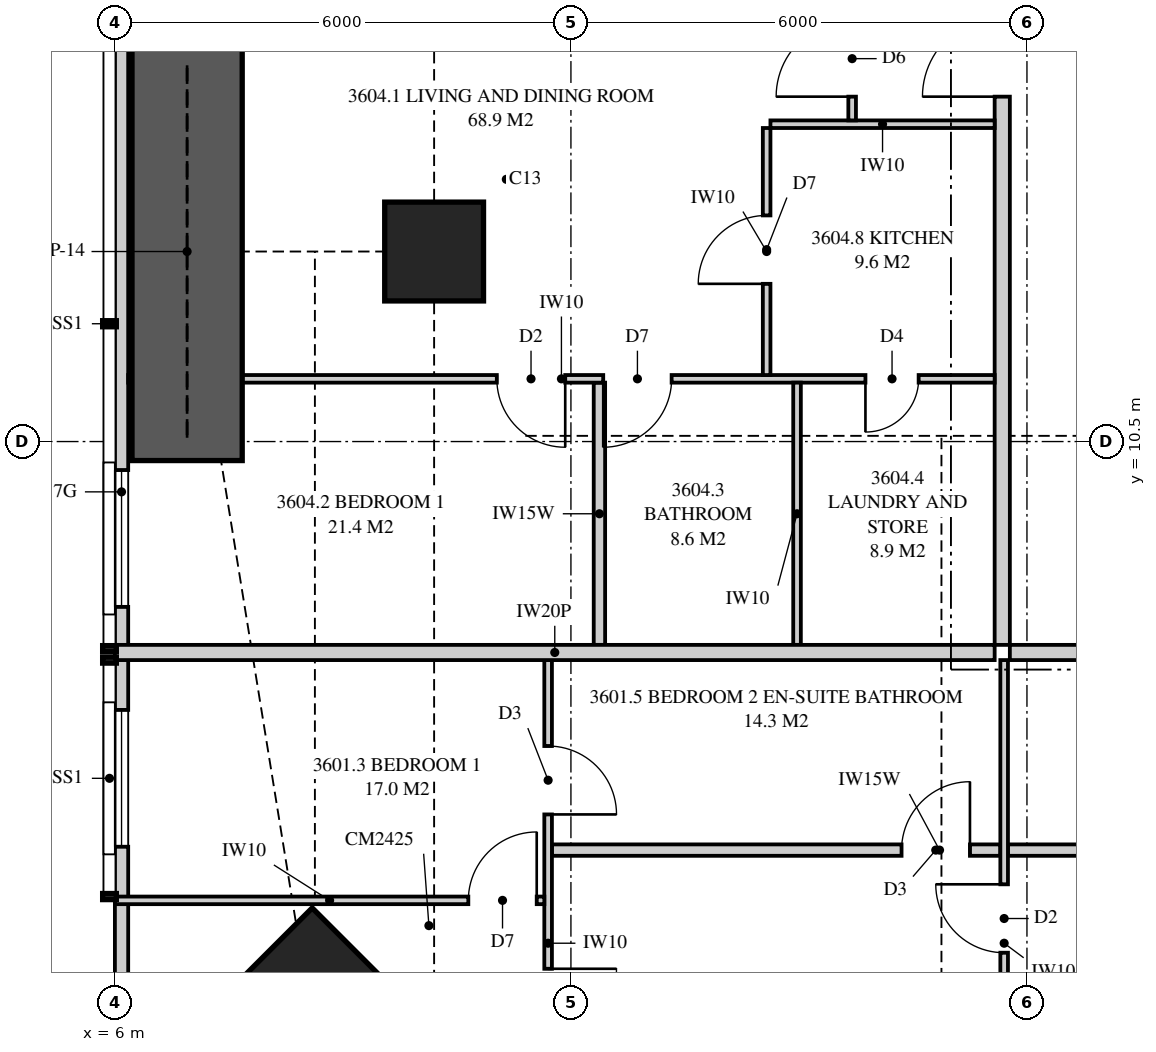
"""IFC4 building model, lengths in metres.
Left out: names, types, materials, properties, quantities, classifications, styles, units other than length and angle.
Written with IfcOpenShell. Run it as: python <this file> out.ifc"""

import sys

from ifc_helpers import new_model, si_unit, direction, frame, frame_2d, origin, origin_2d, place, context, subcontext, project, spatial, polyline, rectangle, outline, extrude, element, fill, save


model = new_model("IFC4")
c1 = context("Model", 3, precision=1e-05, world=origin(), true_north=direction((0.0, 1.0)))
c2 = subcontext(c1, "Body", "Model", "MODEL_VIEW")
j1 = project(units=[si_unit("LENGTHUNIT", "METRE"), si_unit("PLANEANGLEUNIT", "RADIAN")], contexts=[c1])
p1 = place(None, origin())
s1 = spatial("IfcSite", under=j1, at=p1, CompositionType="ELEMENT")
p2 = place(p1, origin())
s2 = spatial("IfcBuilding", under=s1, at=p2, CompositionType="ELEMENT")
p3 = place(p2, frame((0.0, 0.0, 131.65)))
s3 = spatial("IfcBuildingStorey", under=s2, at=p3, CompositionType="ELEMENT", Elevation=131.65)
p4 = place(p3, frame((8.631, 2.631, 0.0), z_axis=(0.0, 0.0, 1.0), x_axis=(0.707106781187, 0.707106781187, 0.0)))
e1 = element("IfcColumn", 1, at=p4, inside=s3, PredefinedType="COLUMN", context=c2, shape_type="SweptSolid", body=[
    extrude(rectangle(XDim=2.4, YDim=2.5, at=origin_2d()), origin(), (0.0, 0.0, 1.0), 3.35),
])
p5 = place(p3, frame((10.2, 13.0, 0.0), z_axis=(0.0, 0.0, 1.0), x_axis=(1.0, 0.0, 0.0)))
e2 = element("IfcColumn", 2, at=p5, inside=s3, PredefinedType="COLUMN", context=c2, shape_type="SweptSolid", body=[
    extrude(rectangle(XDim=1.3, YDim=1.3, at=origin_2d()), origin(), (0.0, 0.0, 1.0), 3.35),
])
p6 = place(p3, frame((6.087, 16.625, 0.0), z_axis=(0.0, 0.0, 1.0), x_axis=(0.0, -1.0, 0.0)))
e3 = element("IfcWall", 3, at=p6, inside=s3, PredefinedType="SOLIDWALL", context=c2, shape_type="SweptSolid", body=[
    extrude(outline(polyline([(0.0, 0.0), (13.574, 0.0), (13.574, 3.11), (3.844, 3.11), (3.844, 2.15), (3.751, 2.15), (3.751, 3.11), (3.625, 3.11), (3.625, 2.15), (0.0, 2.15), (0.0, 0.0)])), frame((0.0, 0.087, 0.0), z_axis=(0.0, -1.0, 0.0), x_axis=(1.0, 0.0, 0.0)), (0.0, 0.0, 1.0), 0.175),
])
p7 = place(p6, frame((6.5, 0.0, 0.4)))
e4 = element("IfcOpeningElement", 4, at=p7, cuts=e3, PredefinedType="OPENING", context=c2, shape_type="SweptSolid", body=[
    extrude(rectangle(XDim=1.8, YDim=1.7, at=frame_2d((0.9, 0.85))), frame((0.0, 0.097, 0.0), z_axis=(0.0, -1.0, 0.0), x_axis=(1.0, 0.0, 0.0)), (0.0, 0.0, 1.0), 0.195),
])
p8 = place(p6, frame((9.656, 0.0, 0.4)))
e5 = element("IfcOpeningElement", 5, at=p8, cuts=e3, PredefinedType="OPENING", context=c2, shape_type="SweptSolid", body=[
    extrude(rectangle(XDim=1.8, YDim=1.7, at=frame_2d((0.9, 0.85))), frame((0.0, 0.097, 0.0), z_axis=(0.0, -1.0, 0.0), x_axis=(1.0, 0.0, 0.0)), (0.0, 0.0, 1.0), 0.195),
])
p9 = place(p3, frame((17.775, 7.725, 0.0), z_axis=(0.0, 0.0, 1.0), x_axis=(1.0, 0.0, 0.0)))
e6 = element("IfcWall", 6, at=p9, inside=s3, PredefinedType="PARTITIONING", context=c2, shape_type="SweptSolid", body=[
    extrude(outline(polyline([(0.0, 0.0), (22.325, 0.0), (22.325, 3.11), (21.187, 3.11), (21.187, 2.541), (20.513, 2.541), (20.513, 3.11), (10.312, 3.11), (10.312, 2.541), (9.638, 2.541), (9.638, 3.11), (0.0, 3.11), (0.0, 0.0)])), frame((0.0, 0.1, 0.0), z_axis=(0.0, -1.0, 0.0), x_axis=(1.0, 0.0, 0.0)), (0.0, 0.0, 1.0), 0.2),
])
p10 = place(p9, frame((4.825, 0.0, 0.0)))
e7 = element("IfcOpeningElement", 7, at=p10, cuts=e6, PredefinedType="OPENING", context=c2, shape_type="SweptSolid", body=[
    extrude(rectangle(XDim=1.05, YDim=2.2, at=frame_2d((0.525, 1.1))), frame((0.0, 0.11, 0.0), z_axis=(0.0, -1.0, 0.0), x_axis=(1.0, 0.0, 0.0)), (0.0, 0.0, 1.0), 0.22),
])
p11 = place(p3, frame((11.7, 0.175, 0.0), z_axis=(0.0, 0.0, 1.0), x_axis=(0.0, 1.0, 0.0)))
e8 = element("IfcWall", 8, at=p11, inside=s3, PredefinedType="PARTITIONING", context=c2, shape_type="SweptSolid", body=[
    extrude(outline(polyline([(0.0, 0.0), (7.45, 0.0), (7.45, 3.11), (2.708, 3.11), (2.708, 2.15), (0.953, 2.15), (0.953, 3.11), (0.0, 3.11), (0.0, 0.0)])), frame((0.0, 0.05, 0.0), z_axis=(0.0, -1.0, 0.0), x_axis=(1.0, 0.0, 0.0)), (0.0, 0.0, 1.0), 0.1),
])
p12 = place(p11, frame((2.489, 0.0, 0.0)))
e9 = element("IfcOpeningElement", 9, at=p12, cuts=e8, PredefinedType="OPENING", context=c2, shape_type="SweptSolid", body=[
    extrude(rectangle(XDim=0.9, YDim=2.1, at=frame_2d((0.45, 1.05))), frame((0.0, 0.06, 0.0), z_axis=(0.0, -1.0, 0.0), x_axis=(1.0, 0.0, 0.0)), (0.0, 0.0, 1.0), 0.12),
])
p13 = place(p11, frame((5.419, 0.0, 0.0)))
e10 = element("IfcOpeningElement", 10, at=p13, cuts=e8, PredefinedType="OPENING", context=c2, shape_type="SweptSolid", body=[
    extrude(rectangle(XDim=0.9, YDim=2.1, at=frame_2d((0.45, 1.05))), frame((0.0, 0.06, 0.0), z_axis=(0.0, -1.0, 0.0), x_axis=(1.0, 0.0, 0.0)), (0.0, 0.0, 1.0), 0.12),
])
p14 = place(p3, frame((17.7, 0.175, 0.0), z_axis=(0.0, 0.0, 1.0), x_axis=(0.0, 1.0, 0.0)))
e11 = element("IfcWall", 11, at=p14, inside=s3, PredefinedType="PARTITIONING", context=c2, shape_type="SweptSolid", body=[
    extrude(outline(polyline([(1.635, 2.15), (0.0, 2.15), (0.0, 0.0), (7.45, 0.0), (7.45, 3.11), (1.635, 3.11), (1.635, 2.15)]), holes=[polyline([(1.021, 0.116), (0.529, 0.116), (0.529, 0.906), (1.021, 0.906), (1.021, 0.116)]), polyline([(1.021, 1.244), (0.529, 1.244), (0.529, 2.034), (1.021, 2.034), (1.021, 1.244)])]), frame((0.0, 0.05, 0.0), z_axis=(0.0, -1.0, 0.0), x_axis=(1.0, 0.0, 0.0)), (0.0, 0.0, 1.0), 0.1),
])
p15 = place(p14, frame((3.6, 0.0, 0.0)))
e12 = element("IfcOpeningElement", 12, at=p15, cuts=e11, PredefinedType="OPENING", context=c2, shape_type="SweptSolid", body=[
    extrude(rectangle(XDim=0.9, YDim=2.1, at=frame_2d((0.45, 1.05))), frame((0.0, 0.06, 0.0), z_axis=(0.0, -1.0, 0.0), x_axis=(1.0, 0.0, 0.0)), (0.0, 0.0, 1.0), 0.12),
])
p16 = place(p3, frame((6.0, 4.464, 0.0), z_axis=(0.0, 0.0, 1.0), x_axis=(1.0, 0.0, 0.0)))
e13 = element("IfcWall", 13, at=p16, inside=s3, PredefinedType="PARTITIONING", context=c2, shape_type="SweptSolid", body=[
    extrude(outline(polyline([(0.0, 0.0), (5.65, 0.0), (5.65, 3.11), (5.46, 3.11), (5.46, 2.51), (3.206, 2.51), (3.206, 2.15), (1.463, 2.15), (1.463, 3.11), (0.0, 3.11), (0.0, 0.0)])), frame((0.0, 0.05, 0.0), z_axis=(0.0, -1.0, 0.0), x_axis=(1.0, 0.0, 0.0)), (0.0, 0.0, 1.0), 0.1),
])
p17 = place(p16, frame((4.65, 0.0, 0.0)))
e14 = element("IfcOpeningElement", 14, at=p17, cuts=e13, PredefinedType="OPENING", context=c2, shape_type="SweptSolid", body=[
    extrude(rectangle(XDim=0.9, YDim=2.1, at=frame_2d((0.45, 1.05))), frame((0.0, 0.06, 0.0), z_axis=(0.0, -1.0, 0.0), x_axis=(1.0, 0.0, 0.0)), (0.0, 0.0, 1.0), 0.12),
])
p18 = place(p3, frame((11.75, 5.125, 0.0), z_axis=(0.0, 0.0, 1.0), x_axis=(1.0, 0.0, 0.0)))
e15 = element("IfcWall", 15, at=p18, inside=s3, PredefinedType="PLUMBINGWALL", context=c2, shape_type="SweptSolid", body=[
    extrude(outline(polyline([(0.0, 0.0), (5.9, 0.0), (5.9, 3.11), (5.438, 3.11), (5.438, 2.541), (4.812, 2.541), (4.812, 3.11), (0.0, 3.11), (0.0, 0.0)])), frame((0.0, 0.075, 0.0), z_axis=(0.0, -1.0, 0.0), x_axis=(1.0, 0.0, 0.0)), (0.0, 0.0, 1.0), 0.15),
])
p19 = place(p18, frame((4.6, 0.0, 0.0)))
e16 = element("IfcOpeningElement", 16, at=p19, cuts=e15, PredefinedType="OPENING", context=c2, shape_type="SweptSolid", body=[
    extrude(rectangle(XDim=0.9, YDim=2.1, at=frame_2d((0.45, 1.05))), frame((0.0, 0.085, 0.0), z_axis=(0.0, -1.0, 0.0), x_axis=(1.0, 0.0, 0.0)), (0.0, 0.0, 1.0), 0.17),
])
p20 = place(p3, frame((17.75, 5.125, 0.0), z_axis=(0.0, 0.0, 1.0), x_axis=(1.0, 0.0, 0.0)))
e17 = element("IfcWall", 17, at=p20, inside=s3, PredefinedType="PLUMBINGWALL", context=c2, shape_type="SweptSolid", body=[
    extrude(rectangle(XDim=4.2, YDim=0.15, at=frame_2d((2.1, 0.0))), origin(), (0.0, 0.0, 1.0), 3.11),
])
p21 = place(p3, frame((6.0, 7.725, 0.0), z_axis=(0.0, 0.0, 1.0), x_axis=(1.0, 0.0, 0.0)))
e18 = element("IfcWall", 18, at=p21, inside=s3, PredefinedType="PARTITIONING", context=c2, shape_type="SweptSolid", body=[
    extrude(outline(polyline([(0.0, 0.0), (11.575, 0.0), (11.575, 3.11), (11.212, 3.11), (11.212, 2.541), (10.538, 2.541), (10.538, 3.11), (5.51, 3.11), (5.51, 2.51), (2.969, 2.51), (2.969, 2.541), (2.727, 2.541), (2.727, 2.15), (0.884, 2.15), (0.884, 3.11), (0.0, 3.11), (0.0, 0.0)])), frame((0.0, 0.1, 0.0), z_axis=(0.0, -1.0, 0.0), x_axis=(1.0, 0.0, 0.0)), (0.0, 0.0, 1.0), 0.2),
])
p22 = place(p3, frame((17.675, 7.825, 0.0), z_axis=(0.0, 0.0, 1.0), x_axis=(0.0, 1.0, 0.0)))
e19 = element("IfcWall", 19, at=p22, inside=s3, PredefinedType="PARTITIONING", context=c2, shape_type="SweptSolid", body=[
    extrude(outline(polyline([(0.0, 0.0), (15.425, 0.0), (15.425, 3.11), (3.087, 3.11), (3.087, 2.541), (2.413, 2.541), (2.413, 3.11), (0.0, 3.11), (0.0, 0.0)])), frame((0.0, 0.1, 0.0), z_axis=(0.0, -1.0, 0.0), x_axis=(1.0, 0.0, 0.0)), (0.0, 0.0, 1.0), 0.2),
])
p23 = place(p22, frame((7.212, 0.0, 0.0)))
e20 = element("IfcOpeningElement", 20, at=p23, cuts=e19, PredefinedType="OPENING", context=c2, shape_type="SweptSolid", body=[
    extrude(rectangle(XDim=1.05, YDim=2.2, at=frame_2d((0.525, 1.1))), frame((0.0, 0.11, 0.0), z_axis=(0.0, -1.0, 0.0), x_axis=(1.0, 0.0, 0.0)), (0.0, 0.0, 1.0), 0.22),
])
p24 = place(p3, frame((6.175, 11.325, 0.0), z_axis=(0.0, 0.0, 1.0), x_axis=(1.0, 0.0, 0.0)))
e21 = element("IfcWall", 21, at=p24, inside=s3, PredefinedType="PARTITIONING", context=c2, shape_type="SweptSolid", body=[
    extrude(outline(polyline([(0.175, 3.11), (0.0, 3.11), (0.0, 0.0), (0.529, 0.0), (0.529, 0.325), (1.021, 0.325), (1.021, 0.0), (11.4, 0.0), (11.4, 3.11), (5.285, 3.11), (5.285, 2.51), (2.765, 2.51), (2.765, 3.11), (2.744, 3.11), (2.744, 2.541), (2.169, 2.541), (2.169, 3.11), (1.918, 3.11), (1.918, 2.15), (1.021, 2.15), (1.021, 1.825), (0.529, 1.825), (0.529, 2.15), (0.175, 2.15), (0.175, 3.11)])), frame((0.0, 0.05, 0.0), z_axis=(0.0, -1.0, 0.0), x_axis=(1.0, 0.0, 0.0)), (0.0, 0.0, 1.0), 0.1),
])
p25 = place(p24, frame((4.85, 0.0, 0.0)))
e22 = element("IfcOpeningElement", 22, at=p25, cuts=e21, PredefinedType="OPENING", context=c2, shape_type="SweptSolid", body=[
    extrude(rectangle(XDim=0.9, YDim=2.1, at=frame_2d((0.45, 1.05))), frame((0.0, 0.06, 0.0), z_axis=(0.0, -1.0, 0.0), x_axis=(1.0, 0.0, 0.0)), (0.0, 0.0, 1.0), 0.12),
])
p26 = place(p24, frame((6.25, 0.0, 0.0)))
e23 = element("IfcOpeningElement", 23, at=p26, cuts=e21, PredefinedType="OPENING", context=c2, shape_type="SweptSolid", body=[
    extrude(rectangle(XDim=0.9, YDim=2.1, at=frame_2d((0.45, 1.05))), frame((0.0, 0.06, 0.0), z_axis=(0.0, -1.0, 0.0), x_axis=(1.0, 0.0, 0.0)), (0.0, 0.0, 1.0), 0.12),
])
p27 = place(p24, frame((9.7, 0.0, 0.0)))
e24 = element("IfcOpeningElement", 24, at=p27, cuts=e21, PredefinedType="OPENING", context=c2, shape_type="SweptSolid", body=[
    extrude(rectangle(XDim=0.7, YDim=2.1, at=frame_2d((0.35, 1.05))), frame((0.0, 0.06, 0.0), z_axis=(0.0, -1.0, 0.0), x_axis=(1.0, 0.0, 0.0)), (0.0, 0.0, 1.0), 0.12),
])
p28 = place(p3, frame((12.375, 7.825, 0.0), z_axis=(0.0, 0.0, 1.0), x_axis=(0.0, 1.0, 0.0)))
e25 = element("IfcWall", 25, at=p28, inside=s3, PredefinedType="PLUMBINGWALL", context=c2, shape_type="SweptSolid", body=[
    extrude(outline(polyline([(0.0, 0.0), (3.45, 0.0), (3.45, 3.11), (3.062, 3.11), (3.062, 2.541), (2.438, 2.541), (2.438, 3.11), (0.0, 3.11), (0.0, 0.0)])), frame((0.0, 0.075, 0.0), z_axis=(0.0, -1.0, 0.0), x_axis=(1.0, 0.0, 0.0)), (0.0, 0.0, 1.0), 0.15),
])
p29 = place(p3, frame((14.975, 7.825, 0.0), z_axis=(0.0, 0.0, 1.0), x_axis=(0.0, 1.0, 0.0)))
e26 = element("IfcWall", 26, at=p29, inside=s3, PredefinedType="PARTITIONING", context=c2, shape_type="SweptSolid", body=[
    extrude(outline(polyline([(0.0, 0.0), (3.45, 0.0), (3.45, 3.11), (3.037, 3.11), (3.037, 2.541), (2.463, 2.541), (2.463, 3.11), (0.0, 3.11), (0.0, 0.0)])), frame((0.0, 0.05, 0.0), z_axis=(0.0, -1.0, 0.0), x_axis=(1.0, 0.0, 0.0)), (0.0, 0.0, 1.0), 0.1),
])
p30 = place(p3, frame((14.575, 11.375, 0.0), z_axis=(0.0, 0.0, 1.0), x_axis=(0.0, 1.0, 0.0)))
e27 = element("IfcWall", 27, at=p30, inside=s3, PredefinedType="PARTITIONING", context=c2, shape_type="SweptSolid", body=[
    extrude(rectangle(XDim=3.25, YDim=0.1, at=frame_2d((1.625, 0.0))), origin(), (0.0, 0.0, 1.0), 3.11),
])
p31 = place(p30, frame((1.2, 0.0, 0.0)))
e28 = element("IfcOpeningElement", 28, at=p31, cuts=e27, PredefinedType="OPENING", context=c2, shape_type="SweptSolid", body=[
    extrude(rectangle(XDim=0.9, YDim=2.1, at=frame_2d((0.45, 1.05))), frame((0.0, 0.06, 0.0), z_axis=(0.0, -1.0, 0.0), x_axis=(1.0, 0.0, 0.0)), (0.0, 0.0, 1.0), 0.12),
])
p32 = place(p3, frame((14.625, 14.675, 0.0), z_axis=(0.0, 0.0, 1.0), x_axis=(1.0, 0.0, 0.0)))
e29 = element("IfcWall", 29, at=p32, inside=s3, PredefinedType="PARTITIONING", context=c2, shape_type="SweptSolid", body=[
    extrude(rectangle(XDim=2.95, YDim=0.1, at=frame_2d((1.475, 0.0))), origin(), (0.0, 0.0, 1.0), 3.11),
])
p33 = place(p3, frame((15.7, 14.725, 0.0), z_axis=(0.0, 0.0, 1.0), x_axis=(0.0, 1.0, 0.0)))
e30 = element("IfcWall", 30, at=p33, inside=s3, PredefinedType="PARTITIONING", context=c2, shape_type="SweptSolid", body=[
    extrude(rectangle(XDim=4.95, YDim=0.1, at=frame_2d((2.475, 0.0))), origin(), (0.0, 0.0, 1.0), 3.11),
])
p34 = place(p33, frame((0.312, 0.0, 0.0)))
e31 = element("IfcOpeningElement", 31, at=p34, cuts=e30, PredefinedType="OPENING", context=c2, shape_type="SweptSolid", body=[
    extrude(rectangle(XDim=1.0, YDim=2.1, at=frame_2d((0.5, 1.05))), frame((0.0, 0.06, 0.0), z_axis=(0.0, -1.0, 0.0), x_axis=(1.0, 0.0, 0.0)), (0.0, 0.0, 1.0), 0.12),
])
p35 = place(p3, frame((6.95, 10.25, 0.0), z_axis=(0.0, 0.0, 1.0), x_axis=(0.0, 1.0, 0.0)))
e32 = element("IfcWall", 32, at=p35, inside=s3, PredefinedType="SHEAR", context=c2, shape_type="SweptSolid", body=[
    extrude(rectangle(XDim=5.5, YDim=1.45, at=frame_2d((2.75, 0.0))), origin(), (0.0, 0.0, 1.0), 3.35),
])
p36 = place(p7, origin())
e33 = element("IfcWindow", 33, at=p36, inside=s3, PartitioningType="SINGLE_PANEL", PredefinedType="WINDOW", context=c2, shape_type="SweptSolid", body=[
    extrude(rectangle(XDim=1.8, YDim=1.7, at=frame_2d((0.9, 0.85))), frame((0.0, 0.03, 0.0), z_axis=(0.0, -1.0, 0.0), x_axis=(1.0, 0.0, 0.0)), (0.0, 0.0, 1.0), 0.06),
])
fill(e4, e33)
p37 = place(p8, origin())
e34 = element("IfcWindow", 34, at=p37, inside=s3, PartitioningType="SINGLE_PANEL", PredefinedType="WINDOW", context=c2, shape_type="SweptSolid", body=[
    extrude(rectangle(XDim=1.8, YDim=1.7, at=frame_2d((0.9, 0.85))), frame((0.0, 0.03, 0.0), z_axis=(0.0, -1.0, 0.0), x_axis=(1.0, 0.0, 0.0)), (0.0, 0.0, 1.0), 0.06),
])
fill(e5, e34)
p38 = place(p17, origin())
e35 = element("IfcDoor", 35, at=p38, inside=s3, OperationType="SINGLE_SWING_RIGHT", PredefinedType="DOOR", context=c2, shape_type="SweptSolid", body=[
    extrude(rectangle(XDim=0.9, YDim=2.1, at=frame_2d((0.45, 1.05))), frame((0.0, 0.025, 0.0), z_axis=(0.0, -1.0, 0.0), x_axis=(1.0, 0.0, 0.0)), (0.0, 0.0, 1.0), 0.05),
])
fill(e14, e35)
p39 = place(p12, frame((0.9, 0.0, 0.0), z_axis=(0.0, 0.0, 1.0), x_axis=(-1.0, 0.0, 0.0)))
e36 = element("IfcDoor", 36, at=p39, inside=s3, OperationType="SINGLE_SWING_LEFT", PredefinedType="DOOR", context=c2, shape_type="SweptSolid", body=[
    extrude(rectangle(XDim=0.9, YDim=2.1, at=frame_2d((0.45, 1.05))), frame((0.0, 0.025, 0.0), z_axis=(0.0, -1.0, 0.0), x_axis=(1.0, 0.0, 0.0)), (0.0, 0.0, 1.0), 0.05),
])
fill(e9, e36)
p40 = place(p15, origin())
e37 = element("IfcDoor", 37, at=p40, inside=s3, OperationType="SINGLE_SWING_RIGHT", PredefinedType="DOOR", context=c2, shape_type="SweptSolid", body=[
    extrude(rectangle(XDim=0.9, YDim=2.1, at=frame_2d((0.45, 1.05))), frame((0.0, 0.025, 0.0), z_axis=(0.0, -1.0, 0.0), x_axis=(1.0, 0.0, 0.0)), (0.0, 0.0, 1.0), 0.05),
])
fill(e12, e37)
p41 = place(p19, origin())
e38 = element("IfcDoor", 38, at=p41, inside=s3, OperationType="SINGLE_SWING_RIGHT", PredefinedType="DOOR", context=c2, shape_type="SweptSolid", body=[
    extrude(rectangle(XDim=0.9, YDim=2.1, at=frame_2d((0.45, 1.05))), frame((0.0, 0.025, 0.0), z_axis=(0.0, -1.0, 0.0), x_axis=(1.0, 0.0, 0.0)), (0.0, 0.0, 1.0), 0.05),
])
fill(e16, e38)
p42 = place(p13, frame((0.9, 0.0, 0.0), z_axis=(0.0, 0.0, 1.0), x_axis=(-1.0, 0.0, 0.0)))
e39 = element("IfcDoor", 39, at=p42, inside=s3, OperationType="SINGLE_SWING_RIGHT", PredefinedType="DOOR", context=c2, shape_type="SweptSolid", body=[
    extrude(rectangle(XDim=0.9, YDim=2.1, at=frame_2d((0.45, 1.05))), frame((0.0, 0.025, 0.0), z_axis=(0.0, -1.0, 0.0), x_axis=(1.0, 0.0, 0.0)), (0.0, 0.0, 1.0), 0.05),
])
fill(e10, e39)
p43 = place(p23, origin())
e40 = element("IfcDoor", 40, at=p43, inside=s3, OperationType="SINGLE_SWING_LEFT", PredefinedType="DOOR", context=c2, shape_type="SweptSolid", body=[
    extrude(rectangle(XDim=1.05, YDim=2.2, at=frame_2d((0.525, 1.1))), frame((0.0, 0.025, 0.0), z_axis=(0.0, -1.0, 0.0), x_axis=(1.0, 0.0, 0.0)), (0.0, 0.0, 1.0), 0.05),
])
fill(e20, e40)
p44 = place(p25, frame((0.9, 0.0, 0.0), z_axis=(0.0, 0.0, 1.0), x_axis=(-1.0, 0.0, 0.0)))
e41 = element("IfcDoor", 41, at=p44, inside=s3, OperationType="SINGLE_SWING_LEFT", PredefinedType="DOOR", context=c2, shape_type="SweptSolid", body=[
    extrude(rectangle(XDim=0.9, YDim=2.1, at=frame_2d((0.45, 1.05))), frame((0.0, 0.025, 0.0), z_axis=(0.0, -1.0, 0.0), x_axis=(1.0, 0.0, 0.0)), (0.0, 0.0, 1.0), 0.05),
])
fill(e22, e41)
p45 = place(p26, frame((0.9, 0.0, 0.0), z_axis=(0.0, 0.0, 1.0), x_axis=(-1.0, 0.0, 0.0)))
e42 = element("IfcDoor", 42, at=p45, inside=s3, OperationType="SINGLE_SWING_RIGHT", PredefinedType="DOOR", context=c2, shape_type="SweptSolid", body=[
    extrude(rectangle(XDim=0.9, YDim=2.1, at=frame_2d((0.45, 1.05))), frame((0.0, 0.025, 0.0), z_axis=(0.0, -1.0, 0.0), x_axis=(1.0, 0.0, 0.0)), (0.0, 0.0, 1.0), 0.05),
])
fill(e23, e42)
p46 = place(p27, frame((0.7, 0.0, 0.0), z_axis=(0.0, 0.0, 1.0), x_axis=(-1.0, 0.0, 0.0)))
e43 = element("IfcDoor", 43, at=p46, inside=s3, OperationType="SINGLE_SWING_RIGHT", PredefinedType="DOOR", context=c2, shape_type="SweptSolid", body=[
    extrude(rectangle(XDim=0.7, YDim=2.1, at=frame_2d((0.35, 1.05))), frame((0.0, 0.025, 0.0), z_axis=(0.0, -1.0, 0.0), x_axis=(1.0, 0.0, 0.0)), (0.0, 0.0, 1.0), 0.05),
])
fill(e24, e43)
p47 = place(p31, origin())
e44 = element("IfcDoor", 44, at=p47, inside=s3, OperationType="SINGLE_SWING_LEFT", PredefinedType="DOOR", context=c2, shape_type="SweptSolid", body=[
    extrude(rectangle(XDim=0.9, YDim=2.1, at=frame_2d((0.45, 1.05))), frame((0.0, 0.025, 0.0), z_axis=(0.0, -1.0, 0.0), x_axis=(1.0, 0.0, 0.0)), (0.0, 0.0, 1.0), 0.05),
])
fill(e28, e44)
p48 = place(p34, origin())
e45 = element("IfcDoor", 45, at=p48, inside=s3, OperationType="SINGLE_SWING_LEFT", PredefinedType="DOOR", context=c2, shape_type="SweptSolid", body=[
    extrude(rectangle(XDim=1.0, YDim=2.1, at=frame_2d((0.5, 1.05))), frame((0.0, 0.025, 0.0), z_axis=(0.0, -1.0, 0.0), x_axis=(1.0, 0.0, 0.0)), (0.0, 0.0, 1.0), 0.05),
])
fill(e31, e45)
save(model, sys.argv[1])
